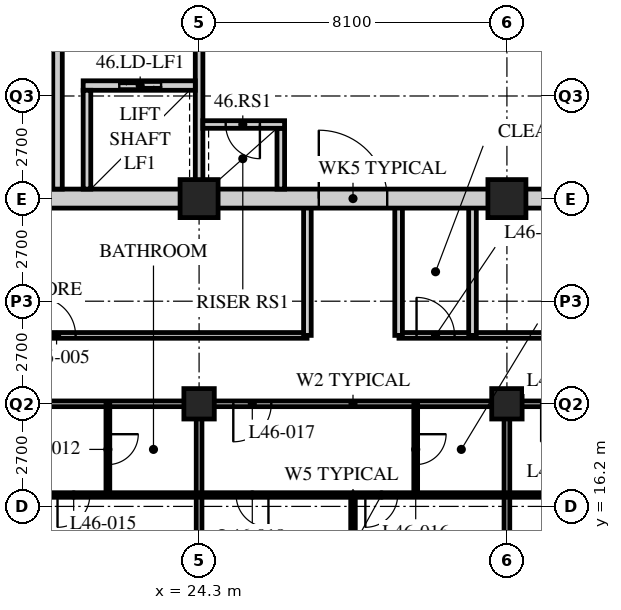
"""IFC4 building model, lengths in metres.
Left out: names, types, materials, properties, quantities, classifications, styles, units other than length and angle.
Written with IfcOpenShell. Run it as: python <this file> out.ifc"""

import sys

from ifc_helpers import new_model, si_unit, direction, frame, frame_2d, origin, origin_2d, place, context, subcontext, project, spatial, rectangle, hollow_rectangle, extrude, element, fill, save


model = new_model("IFC4")
c1 = context("Model", 3, precision=1e-05, world=origin(), true_north=direction((0.0, 1.0)))
c2 = subcontext(c1, "Body", "Model", "MODEL_VIEW")
j1 = project(units=[si_unit("LENGTHUNIT", "METRE"), si_unit("PLANEANGLEUNIT", "RADIAN")], contexts=[c1])
p1 = place(None, origin())
s1 = spatial("IfcSite", under=j1, at=p1, CompositionType="ELEMENT")
p2 = place(p1, origin())
s2 = spatial("IfcBuilding", under=s1, at=p2, CompositionType="ELEMENT")
p3 = place(p2, frame((0.0, 0.0, 181.2)))
s3 = spatial("IfcBuildingStorey", under=s2, at=p3, CompositionType="ELEMENT", Elevation=181.2)
p4 = place(p3, frame((24.3, 18.9, 0.0), z_axis=(0.0, 0.0, 1.0), x_axis=(1.0, 0.0, 0.0)))
e1 = element("IfcColumn", 1, at=p4, inside=s3, PredefinedType="COLUMN", context=c2, shape_type="SweptSolid", body=[
    extrude(hollow_rectangle(XDim=0.8, YDim=0.8, WallThickness=0.08, at=origin_2d()), origin(), (0.0, 0.0, 1.0), 3.6),
])
p5 = place(p3, frame((24.3, 24.3, 0.0), z_axis=(0.0, 0.0, 1.0), x_axis=(1.0, 0.0, 0.0)))
e2 = element("IfcColumn", 2, at=p5, inside=s3, PredefinedType="COLUMN", context=c2, shape_type="SweptSolid", body=[
    extrude(hollow_rectangle(XDim=1.0, YDim=1.0, WallThickness=0.1, at=origin_2d()), origin(), (0.0, 0.0, 1.0), 3.6),
])
p6 = place(p3, frame((32.4, 18.9, 0.0), z_axis=(0.0, 0.0, 1.0), x_axis=(1.0, 0.0, 0.0)))
e3 = element("IfcColumn", 3, at=p6, inside=s3, PredefinedType="COLUMN", context=c2, shape_type="SweptSolid", body=[
    extrude(hollow_rectangle(XDim=0.8, YDim=0.8, WallThickness=0.08, at=origin_2d()), origin(), (0.0, 0.0, 1.0), 3.6),
])
p7 = place(p3, frame((32.4, 24.3, 0.0), z_axis=(0.0, 0.0, 1.0), x_axis=(1.0, 0.0, 0.0)))
e4 = element("IfcColumn", 4, at=p7, inside=s3, PredefinedType="COLUMN", context=c2, shape_type="SweptSolid", body=[
    extrude(hollow_rectangle(XDim=1.0, YDim=1.0, WallThickness=0.1, at=origin_2d()), origin(), (0.0, 0.0, 1.0), 3.6),
])
p8 = place(p3, frame((12.15, 18.9, 0.0), z_axis=(0.0, 0.0, 1.0), x_axis=(1.0, 0.0, 0.0)))
e5 = element("IfcWall", 5, at=p8, inside=s3, PredefinedType="PARTITIONING", context=c2, shape_type="SweptSolid", body=[
    extrude(rectangle(XDim=32.4, YDim=0.15, at=frame_2d((16.2, 0.0))), origin(), (0.0, 0.0, 1.0), 2.778),
])
p9 = place(p8, frame((4.95, 0.0, 0.0)))
e6 = element("IfcOpeningElement", 6, at=p9, cuts=e5, PredefinedType="OPENING", context=c2, shape_type="SweptSolid", body=[
    extrude(rectangle(XDim=1.0, YDim=2.1, at=frame_2d((0.5, 1.05))), frame((0.0, 0.085, 0.0), z_axis=(0.0, -1.0, 0.0), x_axis=(1.0, 0.0, 0.0)), (0.0, 0.0, 1.0), 0.17),
])
p10 = place(p8, frame((13.05, 0.0, 0.0)))
e7 = element("IfcOpeningElement", 7, at=p10, cuts=e5, PredefinedType="OPENING", context=c2, shape_type="SweptSolid", body=[
    extrude(rectangle(XDim=1.0, YDim=2.1, at=frame_2d((0.5, 1.05))), frame((0.0, 0.085, 0.0), z_axis=(0.0, -1.0, 0.0), x_axis=(1.0, 0.0, 0.0)), (0.0, 0.0, 1.0), 0.17),
])
p11 = place(p8, frame((21.15, 0.0, 0.0)))
e8 = element("IfcOpeningElement", 8, at=p11, cuts=e5, PredefinedType="OPENING", context=c2, shape_type="SweptSolid", body=[
    extrude(rectangle(XDim=1.0, YDim=2.1, at=frame_2d((0.5, 1.05))), frame((0.0, 0.085, 0.0), z_axis=(0.0, -1.0, 0.0), x_axis=(1.0, 0.0, 0.0)), (0.0, 0.0, 1.0), 0.17),
])
p12 = place(p8, frame((1.525, 0.0, 0.0)))
e9 = element("IfcOpeningElement", 9, at=p12, cuts=e5, PredefinedType="OPENING", context=c2, shape_type="SweptSolid", body=[
    extrude(rectangle(XDim=1.0, YDim=2.1, at=frame_2d((0.5, 1.05))), frame((0.0, 0.085, 0.0), z_axis=(0.0, -1.0, 0.0), x_axis=(1.0, 0.0, 0.0)), (0.0, 0.0, 1.0), 0.17),
])
p13 = place(p8, frame((29.875, 0.0, 0.0)))
e10 = element("IfcOpeningElement", 10, at=p13, cuts=e5, PredefinedType="OPENING", context=c2, shape_type="SweptSolid", body=[
    extrude(rectangle(XDim=1.0, YDim=2.1, at=frame_2d((0.5, 1.05))), frame((0.0, 0.085, 0.0), z_axis=(0.0, -1.0, 0.0), x_axis=(1.0, 0.0, 0.0)), (0.0, 0.0, 1.0), 0.17),
])
p14 = place(p3, frame((13.95, 20.7, 0.0), z_axis=(0.0, 0.0, 1.0), x_axis=(1.0, 0.0, 0.0)))
e11 = element("IfcWall", 11, at=p14, inside=s3, PredefinedType="PARTITIONING", context=c2, shape_type="SweptSolid", body=[
    extrude(rectangle(XDim=13.19, YDim=0.15, at=frame_2d((6.595, 0.0))), origin(), (0.0, 0.0, 1.0), 3.39),
])
p15 = place(p14, frame((6.1, 0.0, 0.0)))
e12 = element("IfcOpeningElement", 12, at=p15, cuts=e11, PredefinedType="OPENING", context=c2, shape_type="SweptSolid", body=[
    extrude(rectangle(XDim=1.0, YDim=2.1, at=frame_2d((0.5, 1.05))), frame((0.0, 0.085, 0.0), z_axis=(0.0, -1.0, 0.0), x_axis=(1.0, 0.0, 0.0)), (0.0, 0.0, 1.0), 0.17),
])
p16 = place(p3, frame((29.56, 20.7, 0.0), z_axis=(0.0, 0.0, 1.0), x_axis=(1.0, 0.0, 0.0)))
e13 = element("IfcWall", 13, at=p16, inside=s3, PredefinedType="PARTITIONING", context=c2, shape_type="SweptSolid", body=[
    extrude(rectangle(XDim=13.19, YDim=0.15, at=frame_2d((6.595, 0.0))), origin(), (0.0, 0.0, 1.0), 3.39),
])
p17 = place(p16, frame((0.462, 0.0, 0.0)))
e14 = element("IfcOpeningElement", 14, at=p17, cuts=e13, PredefinedType="OPENING", context=c2, shape_type="SweptSolid", body=[
    extrude(rectangle(XDim=1.0, YDim=2.1, at=frame_2d((0.5, 1.05))), frame((0.0, 0.085, 0.0), z_axis=(0.0, -1.0, 0.0), x_axis=(1.0, 0.0, 0.0)), (0.0, 0.0, 1.0), 0.17),
])
p18 = place(p16, frame((7.062, 0.0, 0.0)))
e15 = element("IfcOpeningElement", 15, at=p18, cuts=e13, PredefinedType="OPENING", context=c2, shape_type="SweptSolid", body=[
    extrude(rectangle(XDim=1.0, YDim=2.1, at=frame_2d((0.5, 1.05))), frame((0.0, 0.085, 0.0), z_axis=(0.0, -1.0, 0.0), x_axis=(1.0, 0.0, 0.0)), (0.0, 0.0, 1.0), 0.17),
])
for number, where, z_axis, x_axis in (
    (16, (31.494, 20.7, 0.0), (0.0, 0.0, 1.0), (0.0, 1.0, 0.0)),
    (17, (27.15, 20.7, 0.0), (0.0, 0.0, 1.0), (0.0, 1.0, 0.0)),
    (18, (29.55, 20.7, 0.0), (0.0, 0.0, 1.0), (0.0, 1.0, 0.0)),
):
    element("IfcWall", number, at=place(p3, frame(where, z_axis=z_axis, x_axis=x_axis)), inside=s3, PredefinedType="SOLIDWALL", context=c2, shape_type="SweptSolid", body=[
        extrude(rectangle(XDim=3.6, YDim=0.2, at=frame_2d((1.8, 0.0))), origin(), (0.0, 0.0, 1.0), 3.39),
    ])
p19 = place(p3, frame((21.9, 18.9, 0.0), z_axis=(0.0, 0.0, 1.0), x_axis=(0.0, -1.0, 0.0)))
e19 = element("IfcWall", 19, at=p19, inside=s3, PredefinedType="PARTITIONING", context=c2, shape_type="SweptSolid", body=[
    extrude(rectangle(XDim=2.4, YDim=0.1, at=frame_2d((1.2, 0.0))), origin(), (0.0, 0.0, 1.0), 3.39),
])
p20 = place(p19, frame((0.8, 0.0, 0.0)))
e20 = element("IfcOpeningElement", 20, at=p20, cuts=e19, PredefinedType="OPENING", context=c2, shape_type="SweptSolid", body=[
    extrude(rectangle(XDim=0.8, YDim=2.1, at=frame_2d((0.4, 1.05))), frame((0.0, 0.06, 0.0), z_axis=(0.0, -1.0, 0.0), x_axis=(1.0, 0.0, 0.0)), (0.0, 0.0, 1.0), 0.12),
])
p21 = place(p3, frame((24.3, 18.9, 0.0), z_axis=(0.0, 0.0, 1.0), x_axis=(0.0, -1.0, 0.0)))
e21 = element("IfcWall", 21, at=p21, inside=s3, PredefinedType="PARTITIONING", context=c2, shape_type="SweptSolid", body=[
    extrude(rectangle(XDim=7.8, YDim=0.15, at=frame_2d((3.9, 0.0))), origin(), (0.0, 0.0, 1.0), 2.778),
])
p22 = place(p3, frame((30.0, 18.9, 0.0), z_axis=(0.0, 0.0, 1.0), x_axis=(0.0, -1.0, 0.0)))
e22 = element("IfcWall", 22, at=p22, inside=s3, PredefinedType="PARTITIONING", context=c2, shape_type="SweptSolid", body=[
    extrude(rectangle(XDim=2.4, YDim=0.1, at=frame_2d((1.2, 0.0))), origin(), (0.0, 0.0, 1.0), 3.39),
])
p23 = place(p22, frame((0.8, 0.0, 0.0)))
e23 = element("IfcOpeningElement", 23, at=p23, cuts=e22, PredefinedType="OPENING", context=c2, shape_type="SweptSolid", body=[
    extrude(rectangle(XDim=0.8, YDim=2.1, at=frame_2d((0.4, 1.05))), frame((0.0, 0.06, 0.0), z_axis=(0.0, -1.0, 0.0), x_axis=(1.0, 0.0, 0.0)), (0.0, 0.0, 1.0), 0.12),
])
p24 = place(p3, frame((28.35, 16.5, 0.0), z_axis=(0.0, 0.0, 1.0), x_axis=(0.0, -1.0, 0.0)))
e24 = element("IfcWall", 24, at=p24, inside=s3, PredefinedType="PARTITIONING", context=c2, shape_type="SweptSolid", body=[
    extrude(rectangle(XDim=5.4, YDim=0.12, at=frame_2d((2.7, 0.0))), origin(), (0.0, 0.0, 1.0), 3.39),
])
p25 = place(p3, frame((32.4, 18.9, 0.0), z_axis=(0.0, 0.0, 1.0), x_axis=(0.0, -1.0, 0.0)))
e25 = element("IfcWall", 25, at=p25, inside=s3, PredefinedType="PARTITIONING", context=c2, shape_type="SweptSolid", body=[
    extrude(rectangle(XDim=7.8, YDim=0.15, at=frame_2d((3.9, 0.0))), origin(), (0.0, 0.0, 1.0), 2.778),
])
p26 = place(p3, frame((8.15, 16.5, 0.0), z_axis=(0.0, 0.0, 1.0), x_axis=(1.0, 0.0, 0.0)))
e26 = element("IfcWall", 26, at=p26, inside=s3, PredefinedType="PARTITIONING", context=c2, shape_type="SweptSolid", body=[
    extrude(rectangle(XDim=40.4, YDim=0.12, at=frame_2d((20.2, 0.0))), origin(), (0.0, 0.0, 1.0), 3.39),
])
p27 = place(p26, frame((9.025, 0.0, 0.0)))
e27 = element("IfcOpeningElement", 27, at=p27, cuts=e26, PredefinedType="OPENING", context=c2, shape_type="SweptSolid", body=[
    extrude(rectangle(XDim=0.85, YDim=2.1, at=frame_2d((0.425, 1.05))), frame((0.0, 0.07, 0.0), z_axis=(0.0, -1.0, 0.0), x_axis=(1.0, 0.0, 0.0)), (0.0, 0.0, 1.0), 0.14),
])
p28 = place(p26, frame((12.425, 0.0, 0.0)))
e28 = element("IfcOpeningElement", 28, at=p28, cuts=e26, PredefinedType="OPENING", context=c2, shape_type="SweptSolid", body=[
    extrude(rectangle(XDim=0.85, YDim=2.1, at=frame_2d((0.425, 1.05))), frame((0.0, 0.07, 0.0), z_axis=(0.0, -1.0, 0.0), x_axis=(1.0, 0.0, 0.0)), (0.0, 0.0, 1.0), 0.14),
])
p29 = place(p26, frame((17.125, 0.0, 0.0)))
e29 = element("IfcOpeningElement", 29, at=p29, cuts=e26, PredefinedType="OPENING", context=c2, shape_type="SweptSolid", body=[
    extrude(rectangle(XDim=0.85, YDim=2.1, at=frame_2d((0.425, 1.05))), frame((0.0, 0.07, 0.0), z_axis=(0.0, -1.0, 0.0), x_axis=(1.0, 0.0, 0.0)), (0.0, 0.0, 1.0), 0.14),
])
p30 = place(p26, frame((20.525, 0.0, 0.0)))
e30 = element("IfcOpeningElement", 30, at=p30, cuts=e26, PredefinedType="OPENING", context=c2, shape_type="SweptSolid", body=[
    extrude(rectangle(XDim=0.85, YDim=2.1, at=frame_2d((0.425, 1.05))), frame((0.0, 0.07, 0.0), z_axis=(0.0, -1.0, 0.0), x_axis=(1.0, 0.0, 0.0)), (0.0, 0.0, 1.0), 0.14),
])
p31 = place(p26, frame((25.225, 0.0, 0.0)))
e31 = element("IfcOpeningElement", 31, at=p31, cuts=e26, PredefinedType="OPENING", context=c2, shape_type="SweptSolid", body=[
    extrude(rectangle(XDim=0.85, YDim=2.1, at=frame_2d((0.425, 1.05))), frame((0.0, 0.07, 0.0), z_axis=(0.0, -1.0, 0.0), x_axis=(1.0, 0.0, 0.0)), (0.0, 0.0, 1.0), 0.14),
])
p32 = place(p26, frame((28.625, 0.0, 0.0)))
e32 = element("IfcOpeningElement", 32, at=p32, cuts=e26, PredefinedType="OPENING", context=c2, shape_type="SweptSolid", body=[
    extrude(rectangle(XDim=0.85, YDim=2.1, at=frame_2d((0.425, 1.05))), frame((0.0, 0.07, 0.0), z_axis=(0.0, -1.0, 0.0), x_axis=(1.0, 0.0, 0.0)), (0.0, 0.0, 1.0), 0.14),
])
p33 = place(p26, frame((6.725, 0.0, 0.0)))
e33 = element("IfcOpeningElement", 33, at=p33, cuts=e26, PredefinedType="OPENING", context=c2, shape_type="SweptSolid", body=[
    extrude(rectangle(XDim=0.85, YDim=2.1, at=frame_2d((0.425, 1.05))), frame((0.0, 0.07, 0.0), z_axis=(0.0, -1.0, 0.0), x_axis=(1.0, 0.0, 0.0)), (0.0, 0.0, 1.0), 0.14),
])
p34 = place(p26, frame((2.875, 0.0, 0.0)))
e34 = element("IfcOpeningElement", 34, at=p34, cuts=e26, PredefinedType="OPENING", context=c2, shape_type="SweptSolid", body=[
    extrude(rectangle(XDim=0.85, YDim=2.1, at=frame_2d((0.425, 1.05))), frame((0.0, 0.07, 0.0), z_axis=(0.0, -1.0, 0.0), x_axis=(1.0, 0.0, 0.0)), (0.0, 0.0, 1.0), 0.14),
])
p35 = place(p26, frame((32.825, 0.0, 0.0)))
e35 = element("IfcOpeningElement", 35, at=p35, cuts=e26, PredefinedType="OPENING", context=c2, shape_type="SweptSolid", body=[
    extrude(rectangle(XDim=0.85, YDim=2.1, at=frame_2d((0.425, 1.05))), frame((0.0, 0.07, 0.0), z_axis=(0.0, -1.0, 0.0), x_axis=(1.0, 0.0, 0.0)), (0.0, 0.0, 1.0), 0.14),
])
p36 = place(p26, frame((36.675, 0.0, 0.0)))
e36 = element("IfcOpeningElement", 36, at=p36, cuts=e26, PredefinedType="OPENING", context=c2, shape_type="SweptSolid", body=[
    extrude(rectangle(XDim=0.85, YDim=2.1, at=frame_2d((0.425, 1.05))), frame((0.0, 0.07, 0.0), z_axis=(0.0, -1.0, 0.0), x_axis=(1.0, 0.0, 0.0)), (0.0, 0.0, 1.0), 0.14),
])
p37 = place(p3, frame((15.95, 24.3, 0.0), z_axis=(0.0, 0.0, 1.0), x_axis=(1.0, 0.0, 0.0)))
e37 = element("IfcWall", 37, at=p37, inside=s3, PredefinedType="SOLIDWALL", context=c2, shape_type="SweptSolid", body=[
    extrude(rectangle(XDim=24.8, YDim=0.5, at=frame_2d((12.4, 0.0))), origin(), (0.0, 0.0, 1.0), 2.74),
])
p38 = place(p37, frame((11.5, 0.0, 0.0)))
e38 = element("IfcOpeningElement", 38, at=p38, cuts=e37, PredefinedType="OPENING", context=c2, shape_type="SweptSolid", body=[
    extrude(rectangle(XDim=1.8, YDim=2.4, at=frame_2d((0.9, 1.2))), frame((0.0, 0.26, 0.0), z_axis=(0.0, -1.0, 0.0), x_axis=(1.0, 0.0, 0.0)), (0.0, 0.0, 1.0), 0.52),
])
p39 = place(p3, frame((24.3, 24.55, 0.0), z_axis=(0.0, 0.0, 1.0), x_axis=(0.0, 1.0, 0.0)))
e39 = element("IfcWall", 39, at=p39, inside=s3, PredefinedType="SOLIDWALL", context=c2, shape_type="SweptSolid", body=[
    extrude(rectangle(XDim=7.75, YDim=0.2, at=frame_2d((3.875, 0.0))), origin(), (0.0, 0.0, 1.0), 2.778),
])
p40 = place(p39, frame((4.6, 0.0, 0.0)))
e40 = element("IfcOpeningElement", 40, at=p40, cuts=e39, PredefinedType="OPENING", context=c2, shape_type="SweptSolid", body=[
    extrude(rectangle(XDim=1.2, YDim=2.1, at=frame_2d((0.6, 1.05))), frame((0.0, 0.11, 0.0), z_axis=(0.0, -1.0, 0.0), x_axis=(1.0, 0.0, 0.0)), (0.0, 0.0, 1.0), 0.22),
])
p41 = place(p3, frame((20.575, 24.55, 0.0), z_axis=(0.0, 0.0, 1.0), x_axis=(0.0, 1.0, 0.0)))
e41 = element("IfcWall", 41, at=p41, inside=s3, PredefinedType="SOLIDWALL", context=c2, shape_type="SweptSolid", body=[
    extrude(rectangle(XDim=7.75, YDim=0.25, at=frame_2d((3.875, 0.0))), origin(), (0.0, 0.0, 1.0), 3.39),
])
p42 = place(p41, frame((6.2, 0.0, 0.0)))
e42 = element("IfcOpeningElement", 42, at=p42, cuts=e41, PredefinedType="OPENING", context=c2, shape_type="SweptSolid", body=[
    extrude(rectangle(XDim=1.2, YDim=2.1, at=frame_2d((0.6, 1.05))), frame((0.0, 0.135, 0.0), z_axis=(0.0, -1.0, 0.0), x_axis=(1.0, 0.0, 0.0)), (0.0, 0.0, 1.0), 0.27),
])
p43 = place(p3, frame((21.25, 27.275, 0.0), z_axis=(0.0, 0.0, 1.0), x_axis=(1.0, 0.0, 0.0)))
e43 = element("IfcWall", 43, at=p43, inside=s3, PredefinedType="SOLIDWALL", context=c2, shape_type="SweptSolid", body=[
    extrude(rectangle(XDim=2.95, YDim=0.25, at=frame_2d((1.475, 0.0))), origin(), (0.0, 0.0, 1.0), 3.39),
])
p44 = place(p43, frame((0.95, 0.0, 0.0)))
e44 = element("IfcOpeningElement", 44, at=p44, cuts=e43, PredefinedType="OPENING", context=c2, shape_type="SweptSolid", body=[
    extrude(rectangle(XDim=1.1, YDim=2.4, at=frame_2d((0.55, 1.2))), frame((0.0, 0.135, 0.0), z_axis=(0.0, -1.0, 0.0), x_axis=(1.0, 0.0, 0.0)), (0.0, 0.0, 1.0), 0.27),
])
p45 = place(p3, frame((21.35, 24.55, 0.0), z_axis=(0.0, 0.0, 1.0), x_axis=(0.0, 1.0, 0.0)))
e45 = element("IfcWall", 45, at=p45, inside=s3, PredefinedType="SOLIDWALL", context=c2, shape_type="SweptSolid", body=[
    extrude(rectangle(XDim=2.6, YDim=0.2, at=frame_2d((1.3, 0.0))), origin(), (0.0, 0.0, 1.0), 3.39),
])
p46 = place(p3, frame((26.45, 24.55, 0.0), z_axis=(0.0, 0.0, 1.0), x_axis=(0.0, 1.0, 0.0)))
e46 = element("IfcWall", 46, at=p46, inside=s3, PredefinedType="SOLIDWALL", context=c2, shape_type="SweptSolid", body=[
    extrude(rectangle(XDim=1.6, YDim=0.2, at=frame_2d((0.8, 0.0))), origin(), (0.0, 0.0, 1.0), 3.39),
])
p47 = place(p3, frame((24.4, 26.25, 0.0), z_axis=(0.0, 0.0, 1.0), x_axis=(1.0, 0.0, 0.0)))
e47 = element("IfcWall", 47, at=p47, inside=s3, PredefinedType="SOLIDWALL", context=c2, shape_type="SweptSolid", body=[
    extrude(rectangle(XDim=2.15, YDim=0.2, at=frame_2d((1.075, 0.0))), origin(), (0.0, 0.0, 1.0), 3.39),
])
p48 = place(p47, frame((0.6, 0.0, 0.0)))
e48 = element("IfcOpeningElement", 48, at=p48, cuts=e47, PredefinedType="OPENING", context=c2, shape_type="SweptSolid", body=[
    extrude(rectangle(XDim=0.9, YDim=2.1, at=frame_2d((0.45, 1.05))), frame((0.0, 0.11, 0.0), z_axis=(0.0, -1.0, 0.0), x_axis=(1.0, 0.0, 0.0)), (0.0, 0.0, 1.0), 0.22),
])
p49 = place(p15, origin())
e49 = element("IfcDoor", 49, at=p49, inside=s3, OperationType="SINGLE_SWING_LEFT", PredefinedType="DOOR", context=c2, shape_type="SweptSolid", body=[
    extrude(rectangle(XDim=1.0, YDim=2.1, at=frame_2d((0.5, 1.05))), frame((0.0, 0.025, 0.0), z_axis=(0.0, -1.0, 0.0), x_axis=(1.0, 0.0, 0.0)), (0.0, 0.0, 1.0), 0.05),
])
fill(e12, e49)
p50 = place(p17, origin())
e50 = element("IfcDoor", 50, at=p50, inside=s3, OperationType="SINGLE_SWING_LEFT", PredefinedType="DOOR", context=c2, shape_type="SweptSolid", body=[
    extrude(rectangle(XDim=1.0, YDim=2.1, at=frame_2d((0.5, 1.05))), frame((0.0, 0.025, 0.0), z_axis=(0.0, -1.0, 0.0), x_axis=(1.0, 0.0, 0.0)), (0.0, 0.0, 1.0), 0.05),
])
fill(e14, e50)
p51 = place(p20, origin())
e51 = element("IfcDoor", 51, at=p51, inside=s3, OperationType="SINGLE_SWING_LEFT", PredefinedType="DOOR", context=c2, shape_type="SweptSolid", body=[
    extrude(rectangle(XDim=0.8, YDim=2.1, at=frame_2d((0.4, 1.05))), frame((0.0, 0.025, 0.0), z_axis=(0.0, -1.0, 0.0), x_axis=(1.0, 0.0, 0.0)), (0.0, 0.0, 1.0), 0.05),
])
fill(e20, e51)
p52 = place(p28, origin())
e52 = element("IfcDoor", 52, at=p52, inside=s3, OperationType="SINGLE_SWING_RIGHT", PredefinedType="DOOR", context=c2, shape_type="SweptSolid", body=[
    extrude(rectangle(XDim=0.85, YDim=2.1, at=frame_2d((0.425, 1.05))), frame((0.0, 0.025, 0.0), z_axis=(0.0, -1.0, 0.0), x_axis=(1.0, 0.0, 0.0)), (0.0, 0.0, 1.0), 0.05),
])
fill(e28, e52)
p53 = place(p23, origin())
e53 = element("IfcDoor", 53, at=p53, inside=s3, OperationType="SINGLE_SWING_LEFT", PredefinedType="DOOR", context=c2, shape_type="SweptSolid", body=[
    extrude(rectangle(XDim=0.8, YDim=2.1, at=frame_2d((0.4, 1.05))), frame((0.0, 0.025, 0.0), z_axis=(0.0, -1.0, 0.0), x_axis=(1.0, 0.0, 0.0)), (0.0, 0.0, 1.0), 0.05),
])
fill(e23, e53)
p54 = place(p10, origin())
e54 = element("IfcDoor", 54, at=p54, inside=s3, OperationType="SINGLE_SWING_RIGHT", PredefinedType="DOOR", context=c2, shape_type="SweptSolid", body=[
    extrude(rectangle(XDim=1.0, YDim=2.1, at=frame_2d((0.5, 1.05))), frame((0.0, 0.025, 0.0), z_axis=(0.0, -1.0, 0.0), x_axis=(1.0, 0.0, 0.0)), (0.0, 0.0, 1.0), 0.05),
])
fill(e7, e54)
p55 = place(p29, origin())
e55 = element("IfcDoor", 55, at=p55, inside=s3, OperationType="SINGLE_SWING_LEFT", PredefinedType="DOOR", context=c2, shape_type="SweptSolid", body=[
    extrude(rectangle(XDim=0.85, YDim=2.1, at=frame_2d((0.425, 1.05))), frame((0.0, 0.025, 0.0), z_axis=(0.0, -1.0, 0.0), x_axis=(1.0, 0.0, 0.0)), (0.0, 0.0, 1.0), 0.05),
])
fill(e29, e55)
p56 = place(p30, origin())
e56 = element("IfcDoor", 56, at=p56, inside=s3, OperationType="SINGLE_SWING_RIGHT", PredefinedType="DOOR", context=c2, shape_type="SweptSolid", body=[
    extrude(rectangle(XDim=0.85, YDim=2.1, at=frame_2d((0.425, 1.05))), frame((0.0, 0.025, 0.0), z_axis=(0.0, -1.0, 0.0), x_axis=(1.0, 0.0, 0.0)), (0.0, 0.0, 1.0), 0.05),
])
fill(e30, e56)
p57 = place(p11, origin())
e57 = element("IfcDoor", 57, at=p57, inside=s3, OperationType="SINGLE_SWING_RIGHT", PredefinedType="DOOR", context=c2, shape_type="SweptSolid", body=[
    extrude(rectangle(XDim=1.0, YDim=2.1, at=frame_2d((0.5, 1.05))), frame((0.0, 0.025, 0.0), z_axis=(0.0, -1.0, 0.0), x_axis=(1.0, 0.0, 0.0)), (0.0, 0.0, 1.0), 0.05),
])
fill(e8, e57)
p58 = place(p48, origin())
e58 = element("IfcDoor", 58, at=p58, inside=s3, OperationType="SINGLE_SWING_LEFT", PredefinedType="DOOR", context=c2, shape_type="SweptSolid", body=[
    extrude(rectangle(XDim=0.9, YDim=2.1, at=frame_2d((0.45, 1.05))), frame((0.0, 0.025, 0.0), z_axis=(0.0, -1.0, 0.0), x_axis=(1.0, 0.0, 0.0)), (0.0, 0.0, 1.0), 0.05),
])
fill(e48, e58)
p59 = place(p44, origin())
e59 = element("IfcDoor", 59, at=p59, inside=s3, OperationType="DOUBLE_DOOR_SLIDING", PredefinedType="DOOR", context=c2, shape_type="SweptSolid", body=[
    extrude(rectangle(XDim=1.1, YDim=2.4, at=frame_2d((0.55, 1.2))), frame((0.0, 0.025, 0.0), z_axis=(0.0, -1.0, 0.0), x_axis=(1.0, 0.0, 0.0)), (0.0, 0.0, 1.0), 0.05),
])
fill(e44, e59)
p60 = place(p38, origin())
e60 = element("IfcDoor", 60, at=p60, inside=s3, OperationType="DOUBLE_DOOR_SINGLE_SWING", PredefinedType="DOOR", context=c2, shape_type="SweptSolid", body=[
    extrude(rectangle(XDim=1.8, YDim=2.4, at=frame_2d((0.9, 1.2))), frame((0.0, 0.025, 0.0), z_axis=(0.0, -1.0, 0.0), x_axis=(1.0, 0.0, 0.0)), (0.0, 0.0, 1.0), 0.05),
])
fill(e38, e60)
save(model, sys.argv[1])
